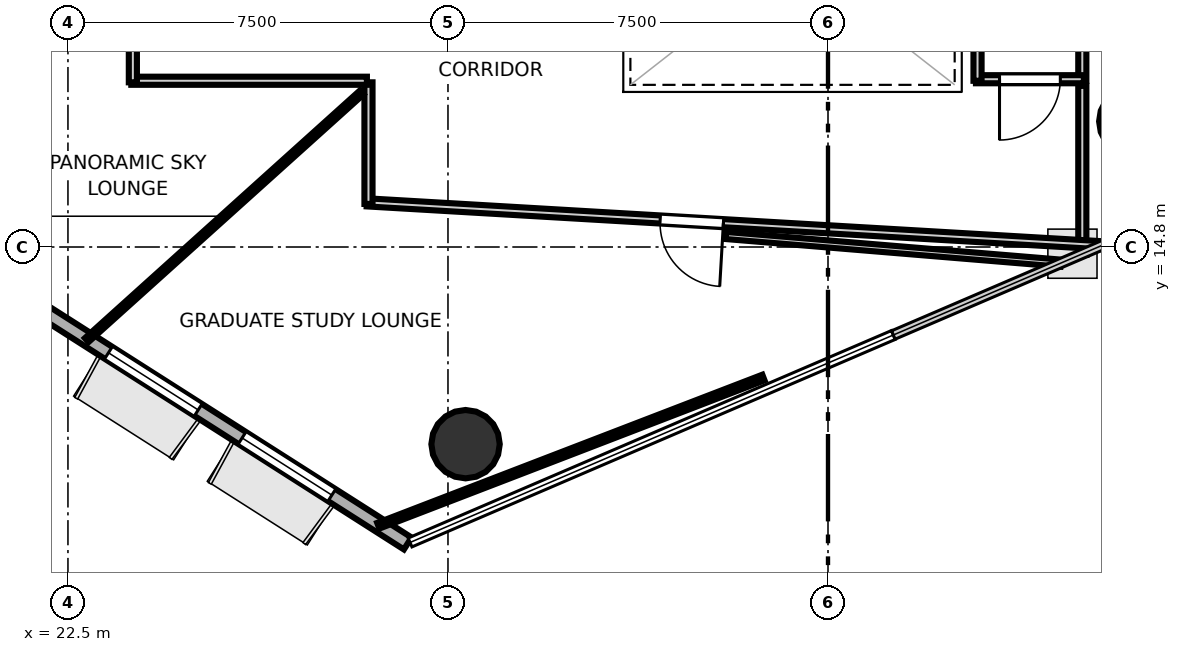
"""IFC4 building model, lengths in metres.
Left out: names, types, materials, properties, quantities, classifications, styles, units other than length and angle.
Written with IfcOpenShell. Run it as: python <this file> out.ifc"""

import sys

from ifc_helpers import new_model, si_unit, direction, frame, frame_2d, origin, origin_2d, place, context, subcontext, project, spatial, rectangle, hollow_circle, extrude, element, fill, save


model = new_model("IFC4")
c1 = context("Model", 3, precision=1e-05, world=origin(), true_north=direction((0.0, 1.0)))
c2 = subcontext(c1, "Body", "Model", "MODEL_VIEW")
j1 = project(units=[si_unit("LENGTHUNIT", "METRE"), si_unit("PLANEANGLEUNIT", "RADIAN")], contexts=[c1])
p1 = place(None, origin())
s1 = spatial("IfcSite", under=j1, at=p1, CompositionType="ELEMENT")
p2 = place(p1, origin())
s2 = spatial("IfcBuilding", under=s1, at=p2, CompositionType="ELEMENT")
p3 = place(p2, frame((0.0, 0.0, 143.1)))
s3 = spatial("IfcBuildingStorey", under=s2, at=p3, CompositionType="ELEMENT", Elevation=143.1)
for number, where, z_axis, x_axis in (
    (1, (30.347, 10.909, -0.27), (0.0, 0.0, 1.0), (1.0, 0.0, 0.0)),
    (2, (43.525, 17.279, -0.27), (0.0, 0.0, 1.0), (1.0, 0.0, 0.0)),
):
    element("IfcColumn", number, at=place(p3, frame(where, z_axis=z_axis, x_axis=x_axis)), inside=s3, PredefinedType="COLUMN", context=c2, shape_type="SweptSolid", body=[
        extrude(hollow_circle(Radius=0.675, WallThickness=0.032, at=origin_2d()), origin(), (0.0, 0.0, 1.0), 4.77),
    ])
p4 = place(p3, frame((21.262, 14.011, 0.0), z_axis=(0.0, 0.0, 1.0), x_axis=(0.843341146408, -0.537378554442, 0.0)))
e3 = element("IfcWall", 3, at=p4, inside=s3, PredefinedType="SOLIDWALL", context=c2, shape_type="SweptSolid", body=[
    extrude(rectangle(XDim=9.419, YDim=0.28, at=frame_2d((4.709, 0.0))), origin(), (0.0, 0.0, 1.0), 4.32),
])
p5 = place(p4, frame((2.416, 0.0, 0.85)))
e4 = element("IfcOpeningElement", 4, at=p5, cuts=e3, PredefinedType="OPENING", context=c2, shape_type="SweptSolid", body=[
    extrude(rectangle(XDim=2.1, YDim=2.2, at=frame_2d((1.05, 1.1))), frame((0.0, 0.15, 0.0), z_axis=(0.0, -1.0, 0.0), x_axis=(1.0, 0.0, 0.0)), (0.0, 0.0, 1.0), 0.3),
])
p6 = place(p4, frame((5.543, 0.0, 0.85)))
e5 = element("IfcOpeningElement", 5, at=p6, cuts=e3, PredefinedType="OPENING", context=c2, shape_type="SweptSolid", body=[
    extrude(rectangle(XDim=2.1, YDim=2.2, at=frame_2d((1.05, 1.1))), frame((0.0, 0.15, 0.0), z_axis=(0.0, -1.0, 0.0), x_axis=(1.0, 0.0, 0.0)), (0.0, 0.0, 1.0), 0.3),
])
p7 = place(p3, frame((42.519, 22.05, 0.0), z_axis=(0.0, 0.0, 1.0), x_axis=(0.0, -1.0, 0.0)))
e6 = element("IfcWall", 6, at=p7, inside=s3, PredefinedType="PARTITIONING", context=c2, shape_type="SweptSolid", body=[
    extrude(rectangle(XDim=3.97, YDim=0.16, at=frame_2d((1.985, 0.0))), origin(), (0.0, 0.0, 1.0), 3.64),
])
p8 = place(p7, frame((1.535, 0.0, 0.0)))
e7 = element("IfcOpeningElement", 7, at=p8, cuts=e6, PredefinedType="OPENING", context=c2, shape_type="SweptSolid", body=[
    extrude(rectangle(XDim=0.9, YDim=2.1, at=frame_2d((0.45, 1.05))), frame((0.0, 0.09, 0.0), z_axis=(0.0, -1.0, 0.0), x_axis=(1.0, 0.0, 0.0)), (0.0, 0.0, 1.0), 0.18),
])
p9 = place(p3, frame((42.55, 18.111, 0.0), z_axis=(0.0, 0.0, 1.0), x_axis=(-1.0, 0.0, 0.0)))
e8 = element("IfcWall", 8, at=p9, inside=s3, PredefinedType="PARTITIONING", context=c2, shape_type="SweptSolid", body=[
    extrude(rectangle(XDim=2.13, YDim=0.16, at=frame_2d((1.065, 0.0))), origin(), (0.0, 0.0, 1.0), 3.64),
])
p10 = place(p9, frame((0.465, 0.0, 0.0)))
e9 = element("IfcOpeningElement", 9, at=p10, cuts=e8, PredefinedType="OPENING", context=c2, shape_type="SweptSolid", body=[
    extrude(rectangle(XDim=1.2, YDim=2.15, at=frame_2d((0.6, 1.075))), frame((0.0, 0.09, 0.0), z_axis=(0.0, -1.0, 0.0), x_axis=(1.0, 0.0, 0.0)), (0.0, 0.0, 1.0), 0.18),
])
p11 = place(p3, frame((40.451, 18.08, 0.0), z_axis=(0.0, 0.0, 1.0), x_axis=(0.0, 1.0, 0.0)))
e10 = element("IfcWall", 10, at=p11, inside=s3, PredefinedType="PARTITIONING", context=c2, shape_type="SweptSolid", body=[
    extrude(rectangle(XDim=3.32, YDim=0.16, at=frame_2d((1.66, 0.0))), origin(), (0.0, 0.0, 1.0), 3.64),
])
p12 = place(p3, frame((42.519, 17.98, 0.0), z_axis=(0.0, 0.0, 1.0), x_axis=(0.0, -1.0, 0.0)))
e11 = element("IfcWall", 11, at=p12, inside=s3, PredefinedType="PARTITIONING", context=c2, shape_type="SweptSolid", body=[
    extrude(rectangle(XDim=3.335, YDim=0.16, at=frame_2d((1.668, 0.0))), origin(), (0.0, 0.0, 1.0), 3.64),
])
p13 = place(p3, frame((42.914, 14.834, 0.0), z_axis=(0.0, 0.0, 1.0), x_axis=(-0.998301769206, 0.058254421299, 0.0)))
e12 = element("IfcWall", 12, at=p13, inside=s3, PredefinedType="PARTITIONING", context=c2, shape_type="SweptSolid", body=[
    extrude(rectangle(XDim=14.538, YDim=0.16, at=frame_2d((7.269, 0.0))), origin(), (0.0, 0.0, 1.0), 3.64),
])
p14 = place(p13, frame((7.49, 0.0, 0.0)))
e13 = element("IfcOpeningElement", 13, at=p14, cuts=e12, PredefinedType="OPENING", context=c2, shape_type="SweptSolid", body=[
    extrude(rectangle(XDim=1.25, YDim=2.2, at=frame_2d((0.625, 1.1))), frame((0.0, 0.09, 0.0), z_axis=(0.0, -1.0, 0.0), x_axis=(1.0, 0.0, 0.0)), (0.0, 0.0, 1.0), 0.18),
])
p15 = place(p3, frame((28.431, 15.65, 0.0), z_axis=(0.0, 0.0, 1.0), x_axis=(0.0, 1.0, 0.0)))
e14 = element("IfcWall", 14, at=p15, inside=s3, PredefinedType="PARTITIONING", context=c2, shape_type="SweptSolid", body=[
    extrude(rectangle(XDim=2.4, YDim=0.16, at=frame_2d((1.2, 0.0))), origin(), (0.0, 0.0, 1.0), 3.64),
])
p16 = place(p3, frame((28.4, 18.081, 0.0), z_axis=(0.0, 0.0, 1.0), x_axis=(-1.0, 0.0, 0.0)))
e15 = element("IfcWall", 15, at=p16, inside=s3, PredefinedType="PARTITIONING", context=c2, shape_type="SweptSolid", body=[
    extrude(rectangle(XDim=4.65, YDim=0.16, at=frame_2d((2.325, 0.0))), origin(), (0.0, 0.0, 1.0), 3.64),
])
p17 = place(p3, frame((23.781, 18.05, 0.0), z_axis=(0.0, 0.0, 1.0), x_axis=(0.0, 1.0, 0.0)))
e16 = element("IfcWall", 16, at=p17, inside=s3, PredefinedType="PARTITIONING", context=c2, shape_type="SweptSolid", body=[
    extrude(rectangle(XDim=5.906, YDim=0.16, at=frame_2d((2.953, 0.0))), origin(), (0.0, 0.0, 1.0), 3.64),
])
p18 = place(p3, frame((28.299, 17.852, 0.0), z_axis=(0.0, 0.0, 1.0), x_axis=(-0.743134593783, -0.669141969632, 0.0)))
e17 = element("IfcWall", 17, at=p18, inside=s3, PredefinedType="PARTITIONING", context=c2, shape_type="SweptSolid", body=[
    extrude(rectangle(XDim=7.305, YDim=0.105, at=frame_2d((3.653, 0.0))), origin(), (0.0, 0.0, 1.0), 3.64),
])
p19 = place(p3, frame((35.487, 15.027, 0.0), z_axis=(0.0, 0.0, 1.0), x_axis=(0.996605450561, -0.082326034225, 0.0)))
e18 = element("IfcWall", 18, at=p19, inside=s3, PredefinedType="PARTITIONING", context=c2, shape_type="SweptSolid", body=[
    extrude(rectangle(XDim=6.628, YDim=0.14, at=frame_2d((3.314, 0.0))), origin(), (0.0, 0.0, 1.0), 3.64),
])
p20 = place(p3, frame((36.226, 12.224, 0.0), z_axis=(0.0, 0.0, 1.0), x_axis=(-0.93330774209, -0.359077510511, 0.0)))
e19 = element("IfcWall", 19, at=p20, inside=s3, PredefinedType="PARTITIONING", context=c2, shape_type="SweptSolid", body=[
    extrude(rectangle(XDim=8.144, YDim=0.12, at=frame_2d((4.072, 0.0))), origin(), (0.0, 0.0, 1.0), 3.64),
])
p21 = place(p10, origin())
e20 = element("IfcDoor", 20, at=p21, inside=s3, OperationType="SINGLE_SWING_RIGHT", PredefinedType="DOOR", context=c2, shape_type="SweptSolid", body=[
    extrude(rectangle(XDim=1.2, YDim=2.15, at=frame_2d((0.6, 1.075))), frame((0.0, 0.025, 0.0), z_axis=(0.0, -1.0, 0.0), x_axis=(1.0, 0.0, 0.0)), (0.0, 0.0, 1.0), 0.05),
])
fill(e9, e20)
p22 = place(p14, origin())
e21 = element("IfcDoor", 21, at=p22, inside=s3, OperationType="SINGLE_SWING_LEFT", PredefinedType="DOOR", context=c2, shape_type="SweptSolid", body=[
    extrude(rectangle(XDim=1.25, YDim=2.2, at=frame_2d((0.625, 1.1))), frame((0.0, 0.025, 0.0), z_axis=(0.0, -1.0, 0.0), x_axis=(1.0, 0.0, 0.0)), (0.0, 0.0, 1.0), 0.05),
])
fill(e13, e21)
p23 = place(p5, origin())
e22 = element("IfcWindow", 22, at=p23, inside=s3, PartitioningType="SINGLE_PANEL", PredefinedType="WINDOW", context=c2, shape_type="SweptSolid", body=[
    extrude(rectangle(XDim=2.1, YDim=2.2, at=frame_2d((1.05, 1.1))), frame((0.0, 0.03, 0.0), z_axis=(0.0, -1.0, 0.0), x_axis=(1.0, 0.0, 0.0)), (0.0, 0.0, 1.0), 0.06),
])
fill(e4, e22)
p24 = place(p6, origin())
e23 = element("IfcWindow", 23, at=p24, inside=s3, PartitioningType="SINGLE_PANEL", PredefinedType="WINDOW", context=c2, shape_type="SweptSolid", body=[
    extrude(rectangle(XDim=2.1, YDim=2.2, at=frame_2d((1.05, 1.1))), frame((0.0, 0.03, 0.0), z_axis=(0.0, -1.0, 0.0), x_axis=(1.0, 0.0, 0.0)), (0.0, 0.0, 1.0), 0.06),
])
fill(e5, e23)
save(model, sys.argv[1])
